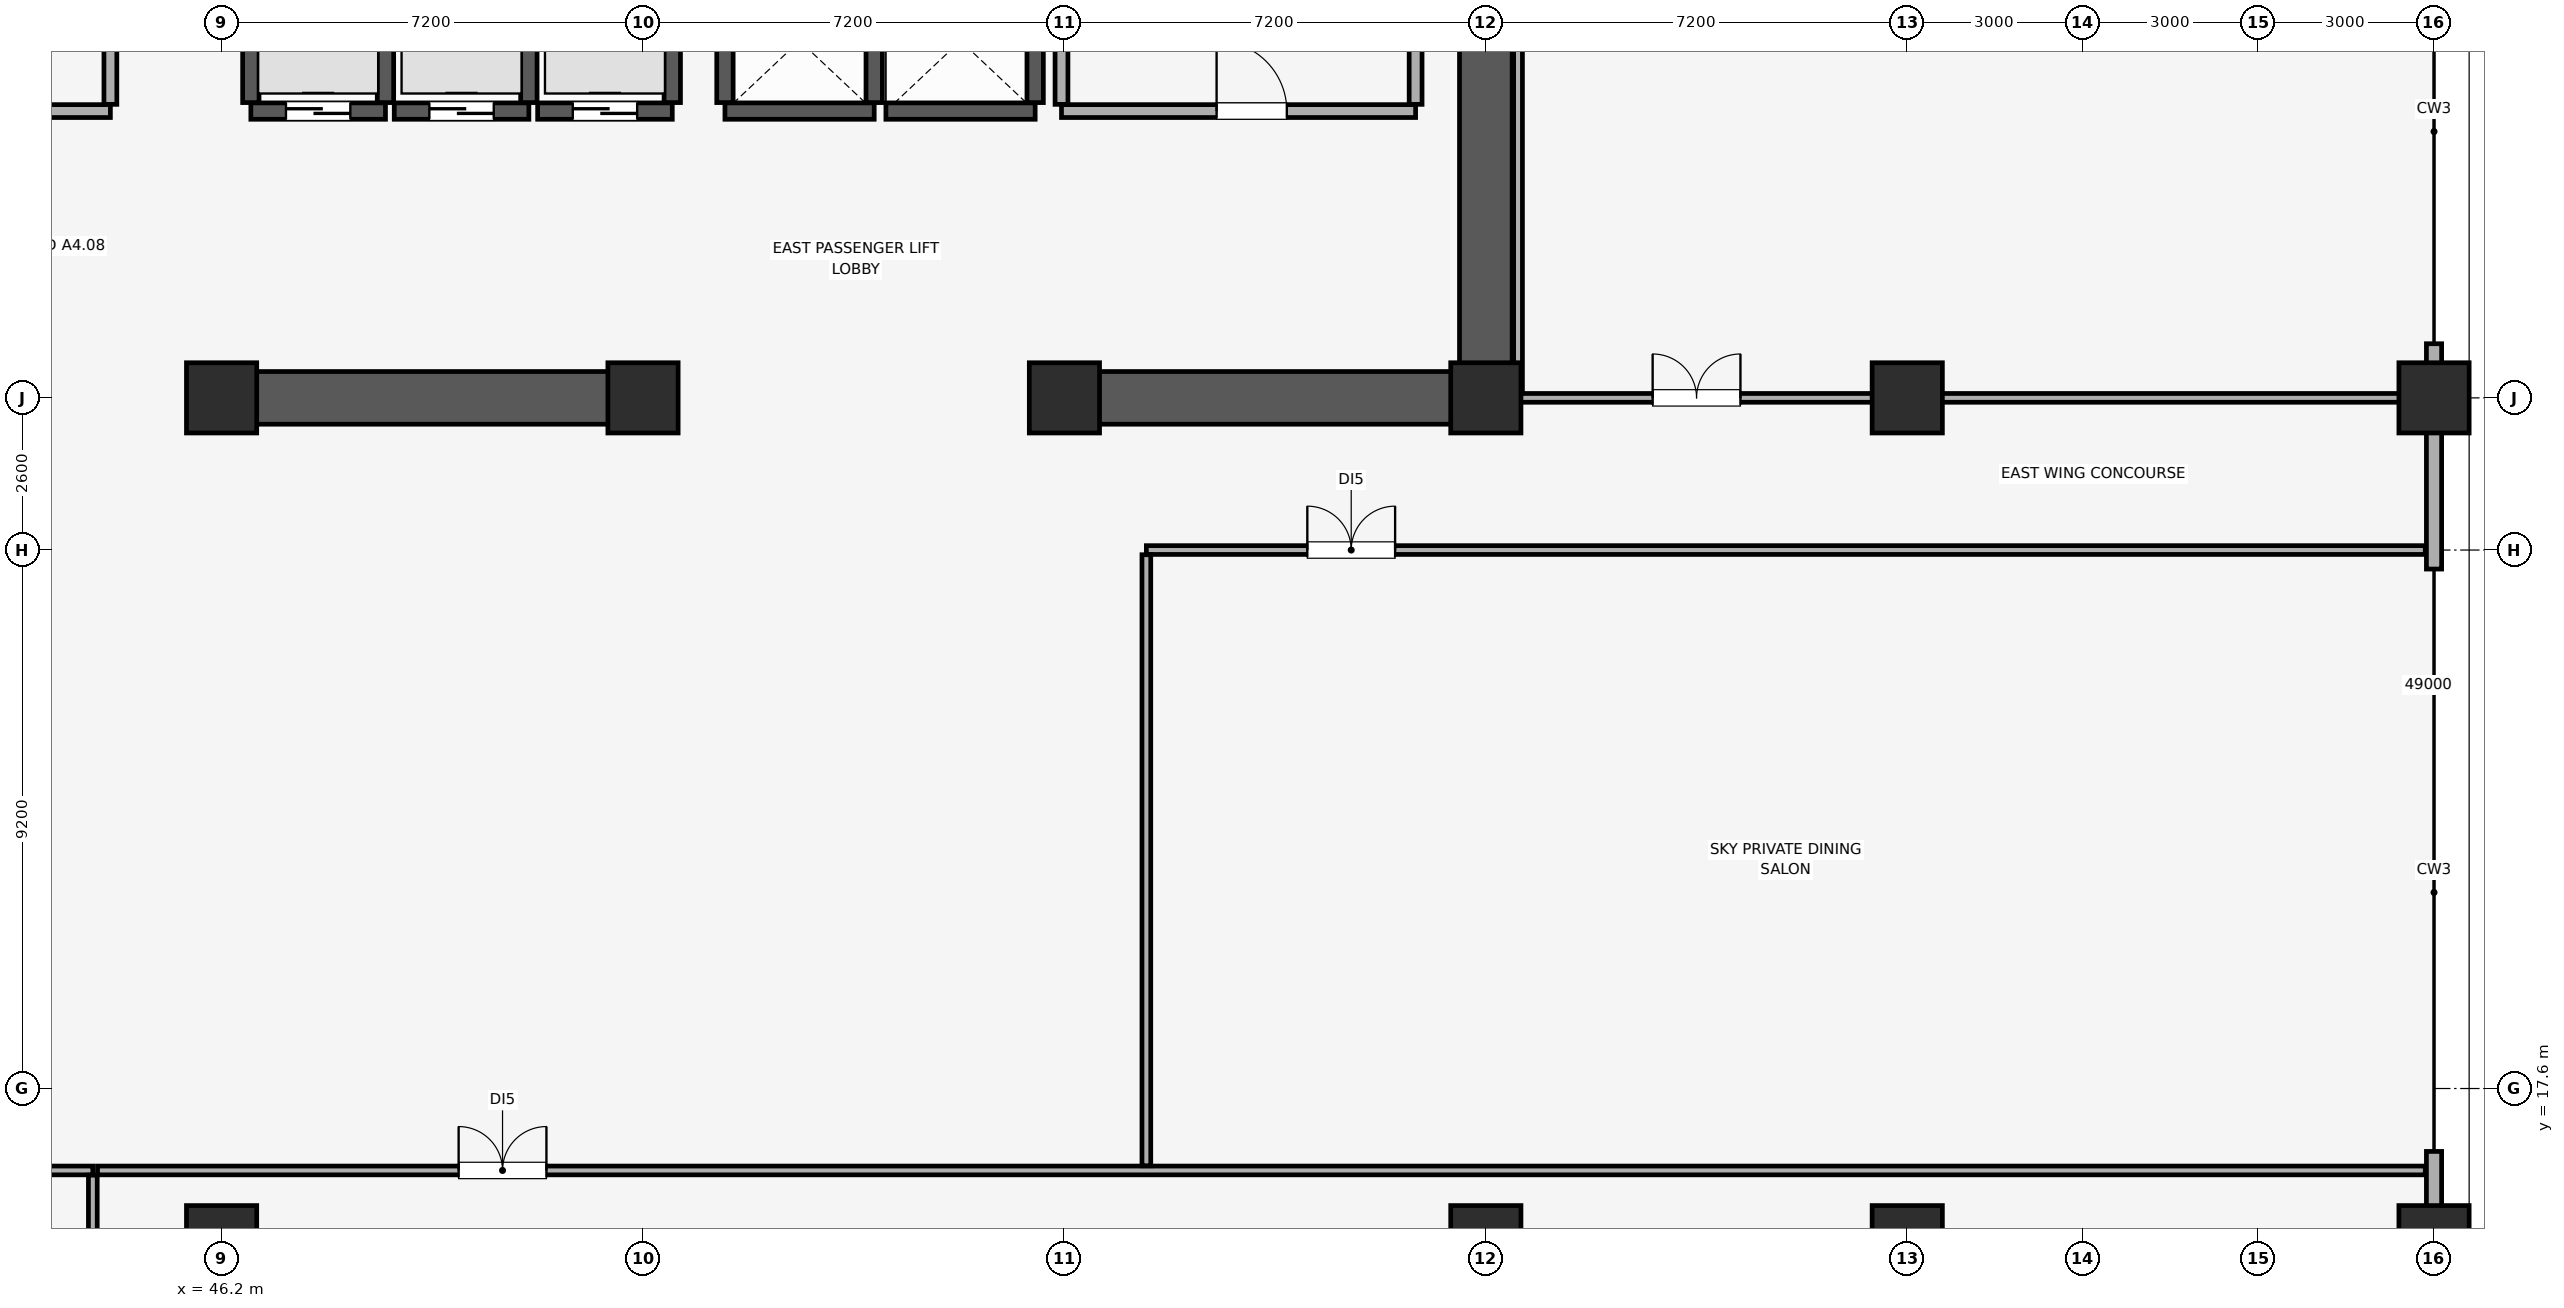
"""IFC4 building model, lengths in metres.
Left out: names, types, materials, properties, quantities, classifications, styles, units other than length and angle.
Written with IfcOpenShell. Run it as: python <this file> out.ifc"""

import sys

from ifc_helpers import new_model, si_unit, direction, frame, frame_2d, origin, origin_2d, place, context, subcontext, project, spatial, rectangle, extrude, element, fill, save


model = new_model("IFC4")
c1 = context("Model", 3, precision=1e-05, world=origin(), true_north=direction((0.0, 1.0)))
c2 = subcontext(c1, "Body", "Model", "MODEL_VIEW")
j1 = project(units=[si_unit("LENGTHUNIT", "METRE"), si_unit("PLANEANGLEUNIT", "RADIAN")], contexts=[c1])
p1 = place(None, origin())
s1 = spatial("IfcSite", under=j1, at=p1, CompositionType="ELEMENT")
p2 = place(p1, origin())
s2 = spatial("IfcBuilding", under=s1, at=p2, CompositionType="ELEMENT")
p3 = place(p2, frame((0.0, 0.0, 130.55)))
s3 = spatial("IfcBuildingStorey", under=s2, at=p3, CompositionType="ELEMENT", Elevation=130.55)
for number, where, z_axis, x_axis in (
    (1, (84.0, 15.0, 0.0), (0.0, 0.0, 1.0), (1.0, 0.0, 0.0)),
    (2, (84.0, 29.4, 0.0), (0.0, 0.0, 1.0), (1.0, 0.0, 0.0)),
    (3, (46.2, 15.0, 0.0), (0.0, 0.0, 1.0), (1.0, 0.0, 0.0)),
    (4, (67.8, 15.0, 0.0), (0.0, 0.0, 1.0), (1.0, 0.0, 0.0)),
    (5, (75.0, 15.0, 0.0), (0.0, 0.0, 1.0), (1.0, 0.0, 0.0)),
    (6, (46.2, 29.4, 0.0), (0.0, 0.0, 1.0), (1.0, 0.0, 0.0)),
    (7, (53.4, 29.4, 0.0), (0.0, 0.0, 1.0), (1.0, 0.0, 0.0)),
    (8, (60.6, 29.4, 0.0), (0.0, 0.0, 1.0), (1.0, 0.0, 0.0)),
    (9, (67.8, 29.4, 0.0), (0.0, 0.0, 1.0), (1.0, 0.0, 0.0)),
    (10, (75.0, 29.4, 0.0), (0.0, 0.0, 1.0), (1.0, 0.0, 0.0)),
):
    element("IfcColumn", number, at=place(p3, frame(where, z_axis=z_axis, x_axis=x_axis)), inside=s3, PredefinedType="COLUMN", context=c2, shape_type="SweptSolid", body=[
        extrude(rectangle(XDim=1.2, YDim=1.2, at=origin_2d()), origin(), (0.0, 0.0, 1.0), 4.56),
    ])
p4 = place(p3, frame((84.0, 14.075, 0.0), z_axis=(0.0, 0.0, 1.0), x_axis=(0.0, 1.0, 0.0)))
e11 = element("IfcWall", 11, at=p4, inside=s3, PredefinedType="SOLIDWALL", context=c2, shape_type="SweptSolid", body=[
    extrude(rectangle(XDim=2.45, YDim=0.26, at=frame_2d((1.225, 0.0))), origin(), (0.0, 0.0, 1.0), 4.52),
])
p5 = place(p3, frame((84.0, 26.475, 0.0), z_axis=(0.0, 0.0, 1.0), x_axis=(0.0, 1.0, 0.0)))
e12 = element("IfcWall", 12, at=p5, inside=s3, PredefinedType="SOLIDWALL", context=c2, shape_type="SweptSolid", body=[
    extrude(rectangle(XDim=3.85, YDim=0.26, at=frame_2d((1.925, 0.0))), origin(), (0.0, 0.0, 1.0), 4.52),
])
p6 = place(p3, frame((67.8, 29.4, 0.0), z_axis=(0.0, 0.0, 1.0), x_axis=(0.0, 1.0, 0.0)))
e13 = element("IfcWall", 13, at=p6, inside=s3, PredefinedType="SHEAR", context=c2, shape_type="SweptSolid", body=[
    extrude(rectangle(XDim=19.2, YDim=0.9, at=frame_2d((9.6, 0.0))), origin(), (0.0, 0.0, 1.0), 4.52),
])
p7 = place(p3, frame((46.0, 29.4, 0.0), z_axis=(0.0, 0.0, 1.0), x_axis=(1.0, 0.0, 0.0)))
e14 = element("IfcWall", 14, at=p7, inside=s3, PredefinedType="SHEAR", context=c2, shape_type="SweptSolid", body=[
    extrude(rectangle(XDim=7.6, YDim=0.9, at=frame_2d((3.8, 0.0))), origin(), (0.0, 0.0, 1.0), 4.52),
])
p8 = place(p3, frame((60.4, 29.4, 0.0), z_axis=(0.0, 0.0, 1.0), x_axis=(1.0, 0.0, 0.0)))
e15 = element("IfcWall", 15, at=p8, inside=s3, PredefinedType="SHEAR", context=c2, shape_type="SweptSolid", body=[
    extrude(rectangle(XDim=6.945, YDim=0.9, at=frame_2d((3.473, 0.0))), origin(), (0.0, 0.0, 1.0), 4.52),
])
p9 = place(p3, frame((46.7, 34.3, 0.0), z_axis=(0.0, 0.0, 1.0), x_axis=(1.0, 0.0, 0.0)))
e16 = element("IfcWall", 16, at=p9, inside=s3, PredefinedType="SHEAR", context=c2, shape_type="SweptSolid", body=[
    extrude(rectangle(XDim=2.3, YDim=0.28, at=frame_2d((1.15, 0.0))), origin(), (0.0, 0.0, 1.0), 4.52),
])
p10 = place(p9, frame((0.6, 0.0, 0.0)))
e17 = element("IfcOpeningElement", 17, at=p10, cuts=e16, PredefinedType="OPENING", context=c2, shape_type="SweptSolid", body=[
    extrude(rectangle(XDim=1.1, YDim=2.2, at=frame_2d((0.55, 1.1))), frame((0.0, 0.15, 0.0), z_axis=(0.0, -1.0, 0.0), x_axis=(1.0, 0.0, 0.0)), (0.0, 0.0, 1.0), 0.3),
])
for number, where, z_axis, x_axis in (
    (18, (46.7, 34.445, 0.0), (0.0, 0.0, 1.0), (0.0, 1.0, 0.0)),
    (19, (49.0, 34.445, 0.0), (0.0, 0.0, 1.0), (0.0, 1.0, 0.0)),
):
    element("IfcWall", number, at=place(p3, frame(where, z_axis=z_axis, x_axis=x_axis)), inside=s3, PredefinedType="SHEAR", context=c2, shape_type="SweptSolid", body=[
        extrude(rectangle(XDim=2.01, YDim=0.28, at=frame_2d((1.005, 0.0))), origin(), (0.0, 0.0, 1.0), 4.52),
    ])
p11 = place(p3, frame((49.15, 34.3, 0.0), z_axis=(0.0, 0.0, 1.0), x_axis=(1.0, 0.0, 0.0)))
e20 = element("IfcWall", 20, at=p11, inside=s3, PredefinedType="SHEAR", context=c2, shape_type="SweptSolid", body=[
    extrude(rectangle(XDim=2.3, YDim=0.28, at=frame_2d((1.15, 0.0))), origin(), (0.0, 0.0, 1.0), 4.52),
])
p12 = place(p11, frame((0.6, 0.0, 0.0)))
e21 = element("IfcOpeningElement", 21, at=p12, cuts=e20, PredefinedType="OPENING", context=c2, shape_type="SweptSolid", body=[
    extrude(rectangle(XDim=1.1, YDim=2.2, at=frame_2d((0.55, 1.1))), frame((0.0, 0.15, 0.0), z_axis=(0.0, -1.0, 0.0), x_axis=(1.0, 0.0, 0.0)), (0.0, 0.0, 1.0), 0.3),
])
p13 = place(p3, frame((51.45, 34.445, 0.0), z_axis=(0.0, 0.0, 1.0), x_axis=(0.0, 1.0, 0.0)))
e22 = element("IfcWall", 22, at=p13, inside=s3, PredefinedType="SHEAR", context=c2, shape_type="SweptSolid", body=[
    extrude(rectangle(XDim=2.01, YDim=0.28, at=frame_2d((1.005, 0.0))), origin(), (0.0, 0.0, 1.0), 4.52),
])
p14 = place(p3, frame((51.6, 34.3, 0.0), z_axis=(0.0, 0.0, 1.0), x_axis=(1.0, 0.0, 0.0)))
e23 = element("IfcWall", 23, at=p14, inside=s3, PredefinedType="SHEAR", context=c2, shape_type="SweptSolid", body=[
    extrude(rectangle(XDim=2.3, YDim=0.28, at=frame_2d((1.15, 0.0))), origin(), (0.0, 0.0, 1.0), 4.52),
])
p15 = place(p14, frame((0.6, 0.0, 0.0)))
e24 = element("IfcOpeningElement", 24, at=p15, cuts=e23, PredefinedType="OPENING", context=c2, shape_type="SweptSolid", body=[
    extrude(rectangle(XDim=1.1, YDim=2.2, at=frame_2d((0.55, 1.1))), frame((0.0, 0.15, 0.0), z_axis=(0.0, -1.0, 0.0), x_axis=(1.0, 0.0, 0.0)), (0.0, 0.0, 1.0), 0.3),
])
p16 = place(p3, frame((53.9, 34.445, 0.0), z_axis=(0.0, 0.0, 1.0), x_axis=(0.0, 1.0, 0.0)))
e25 = element("IfcWall", 25, at=p16, inside=s3, PredefinedType="SHEAR", context=c2, shape_type="SweptSolid", body=[
    extrude(rectangle(XDim=2.01, YDim=0.28, at=frame_2d((1.005, 0.0))), origin(), (0.0, 0.0, 1.0), 4.52),
])
p17 = place(p3, frame((54.8, 34.3, 0.0), z_axis=(0.0, 0.0, 1.0), x_axis=(1.0, 0.0, 0.0)))
e26 = element("IfcWall", 26, at=p17, inside=s3, PredefinedType="SHEAR", context=c2, shape_type="SweptSolid", body=[
    extrude(rectangle(XDim=2.55, YDim=0.28, at=frame_2d((1.275, 0.0))), origin(), (0.0, 0.0, 1.0), 4.52),
])
for number, where, z_axis, x_axis in (
    (27, (54.8, 34.445, 0.0), (0.0, 0.0, 1.0), (0.0, 1.0, 0.0)),
    (28, (57.35, 34.445, 0.0), (0.0, 0.0, 1.0), (0.0, 1.0, 0.0)),
):
    element("IfcWall", number, at=place(p3, frame(where, z_axis=z_axis, x_axis=x_axis)), inside=s3, PredefinedType="SHEAR", context=c2, shape_type="SweptSolid", body=[
        extrude(rectangle(XDim=2.11, YDim=0.28, at=frame_2d((1.055, 0.0))), origin(), (0.0, 0.0, 1.0), 4.52),
    ])
p18 = place(p3, frame((57.55, 34.3, 0.0), z_axis=(0.0, 0.0, 1.0), x_axis=(1.0, 0.0, 0.0)))
e29 = element("IfcWall", 29, at=p18, inside=s3, PredefinedType="SHEAR", context=c2, shape_type="SweptSolid", body=[
    extrude(rectangle(XDim=2.55, YDim=0.28, at=frame_2d((1.275, 0.0))), origin(), (0.0, 0.0, 1.0), 4.52),
])
p19 = place(p3, frame((60.1, 34.445, 0.0), z_axis=(0.0, 0.0, 1.0), x_axis=(0.0, 1.0, 0.0)))
e30 = element("IfcWall", 30, at=p19, inside=s3, PredefinedType="SHEAR", context=c2, shape_type="SweptSolid", body=[
    extrude(rectangle(XDim=2.11, YDim=0.28, at=frame_2d((1.055, 0.0))), origin(), (0.0, 0.0, 1.0), 4.52),
])
p20 = place(p3, frame((60.55, 34.3, 0.0), z_axis=(0.0, 0.0, 1.0), x_axis=(1.0, 0.0, 0.0)))
e31 = element("IfcWall", 31, at=p20, inside=s3, PredefinedType="PARTITIONING", context=c2, shape_type="SweptSolid", body=[
    extrude(rectangle(XDim=6.05, YDim=0.22, at=frame_2d((3.025, 0.0))), origin(), (0.0, 0.0, 1.0), 4.52),
])
p21 = place(p20, frame((2.65, 0.0, 0.0)))
e32 = element("IfcOpeningElement", 32, at=p21, cuts=e31, PredefinedType="OPENING", context=c2, shape_type="SweptSolid", body=[
    extrude(rectangle(XDim=1.2, YDim=2.15, at=frame_2d((0.6, 1.075))), frame((0.0, 0.12, 0.0), z_axis=(0.0, -1.0, 0.0), x_axis=(1.0, 0.0, 0.0)), (0.0, 0.0, 1.0), 0.24),
])
p22 = place(p3, frame((60.55, 34.415, 0.0), z_axis=(0.0, 0.0, 1.0), x_axis=(0.0, 1.0, 0.0)))
e33 = element("IfcWall", 33, at=p22, inside=s3, PredefinedType="PARTITIONING", context=c2, shape_type="SweptSolid", body=[
    extrude(rectangle(XDim=5.64, YDim=0.22, at=frame_2d((2.82, 0.0))), origin(), (0.0, 0.0, 1.0), 4.52),
])
p23 = place(p3, frame((66.6, 34.415, 0.0), z_axis=(0.0, 0.0, 1.0), x_axis=(0.0, 1.0, 0.0)))
e34 = element("IfcWall", 34, at=p23, inside=s3, PredefinedType="PARTITIONING", context=c2, shape_type="SweptSolid", body=[
    extrude(rectangle(XDim=5.43, YDim=0.22, at=frame_2d((2.715, 0.0))), origin(), (0.0, 0.0, 1.0), 4.52),
])
p24 = place(p3, frame((39.7, 34.3, 0.0), z_axis=(0.0, 0.0, 1.0), x_axis=(1.0, 0.0, 0.0)))
e35 = element("IfcWall", 35, at=p24, inside=s3, PredefinedType="PARTITIONING", context=c2, shape_type="SweptSolid", body=[
    extrude(rectangle(XDim=4.6, YDim=0.22, at=frame_2d((2.3, 0.0))), origin(), (0.0, 0.0, 1.0), 4.52),
])
p25 = place(p24, frame((1.7, 0.0, 0.0)))
e36 = element("IfcOpeningElement", 36, at=p25, cuts=e35, PredefinedType="OPENING", context=c2, shape_type="SweptSolid", body=[
    extrude(rectangle(XDim=1.2, YDim=2.15, at=frame_2d((0.6, 1.075))), frame((0.0, 0.12, 0.0), z_axis=(0.0, -1.0, 0.0), x_axis=(1.0, 0.0, 0.0)), (0.0, 0.0, 1.0), 0.24),
])
p26 = place(p3, frame((44.3, 34.415, 0.0), z_axis=(0.0, 0.0, 1.0), x_axis=(0.0, 1.0, 0.0)))
e37 = element("IfcWall", 37, at=p26, inside=s3, PredefinedType="PARTITIONING", context=c2, shape_type="SweptSolid", body=[
    extrude(rectangle(XDim=5.785, YDim=0.22, at=frame_2d((2.893, 0.0))), origin(), (0.0, 0.0, 1.0), 4.52),
])
p27 = place(p3, frame((0.15, 16.2, 0.0), z_axis=(0.0, 0.0, 1.0), x_axis=(1.0, 0.0, 0.0)))
e38 = element("IfcWall", 38, at=p27, inside=s3, PredefinedType="PARTITIONING", context=c2, shape_type="SweptSolid", body=[
    extrude(rectangle(XDim=43.85, YDim=0.15, at=frame_2d((21.925, 0.0))), origin(), (0.0, 0.0, 1.0), 4.52),
])
p28 = place(p27, frame((31.1, 0.0, 0.0)))
e39 = element("IfcOpeningElement", 39, at=p28, cuts=e38, PredefinedType="OPENING", context=c2, shape_type="SweptSolid", body=[
    extrude(rectangle(XDim=1.5, YDim=2.25, at=frame_2d((0.75, 1.125))), frame((0.0, 0.085, 0.0), z_axis=(0.0, -1.0, 0.0), x_axis=(1.0, 0.0, 0.0)), (0.0, 0.0, 1.0), 0.17),
])
p29 = place(p3, frame((44.0, 0.15, 0.0), z_axis=(0.0, 0.0, 1.0), x_axis=(0.0, 1.0, 0.0)))
e40 = element("IfcWall", 40, at=p29, inside=s3, PredefinedType="PARTITIONING", context=c2, shape_type="SweptSolid", body=[
    extrude(rectangle(XDim=15.97, YDim=0.15, at=frame_2d((7.985, 0.0))), origin(), (0.0, 0.0, 1.0), 4.52),
])
p30 = place(p3, frame((44.08, 16.2, 0.0), z_axis=(0.0, 0.0, 1.0), x_axis=(1.0, 0.0, 0.0)))
e41 = element("IfcWall", 41, at=p30, inside=s3, PredefinedType="PARTITIONING", context=c2, shape_type="SweptSolid", body=[
    extrude(rectangle(XDim=39.77, YDim=0.15, at=frame_2d((19.885, 0.0))), origin(), (0.0, 0.0, 1.0), 4.52),
])
p31 = place(p30, frame((6.17, 0.0, 0.0)))
e42 = element("IfcOpeningElement", 42, at=p31, cuts=e41, PredefinedType="OPENING", context=c2, shape_type="SweptSolid", body=[
    extrude(rectangle(XDim=1.5, YDim=2.25, at=frame_2d((0.75, 1.125))), frame((0.0, 0.085, 0.0), z_axis=(0.0, -1.0, 0.0), x_axis=(1.0, 0.0, 0.0)), (0.0, 0.0, 1.0), 0.17),
])
p32 = place(p3, frame((62.0, 26.8, 0.0), z_axis=(0.0, 0.0, 1.0), x_axis=(1.0, 0.0, 0.0)))
e43 = element("IfcWall", 43, at=p32, inside=s3, PredefinedType="PARTITIONING", context=c2, shape_type="SweptSolid", body=[
    extrude(rectangle(XDim=21.85, YDim=0.15, at=frame_2d((10.925, 0.0))), origin(), (0.0, 0.0, 1.0), 4.52),
])
p33 = place(p32, frame((2.75, 0.0, 0.0)))
e44 = element("IfcOpeningElement", 44, at=p33, cuts=e43, PredefinedType="OPENING", context=c2, shape_type="SweptSolid", body=[
    extrude(rectangle(XDim=1.5, YDim=2.25, at=frame_2d((0.75, 1.125))), frame((0.0, 0.085, 0.0), z_axis=(0.0, -1.0, 0.0), x_axis=(1.0, 0.0, 0.0)), (0.0, 0.0, 1.0), 0.17),
])
p34 = place(p3, frame((62.0, 16.28, 0.0), z_axis=(0.0, 0.0, 1.0), x_axis=(0.0, 1.0, 0.0)))
e45 = element("IfcWall", 45, at=p34, inside=s3, PredefinedType="PARTITIONING", context=c2, shape_type="SweptSolid", body=[
    extrude(rectangle(XDim=10.44, YDim=0.15, at=frame_2d((5.22, 0.0))), origin(), (0.0, 0.0, 1.0), 4.52),
])
p35 = place(p3, frame((68.35, 29.4, 0.0), z_axis=(0.0, 0.0, 1.0), x_axis=(1.0, 0.0, 0.0)))
e46 = element("IfcWall", 46, at=p35, inside=s3, PredefinedType="PARTITIONING", context=c2, shape_type="SweptSolid", body=[
    extrude(rectangle(XDim=15.5, YDim=0.15, at=frame_2d((7.75, 0.0))), origin(), (0.0, 0.0, 1.0), 3.4),
])
p36 = place(p35, frame((2.3, 0.0, 0.0)))
e47 = element("IfcOpeningElement", 47, at=p36, cuts=e46, PredefinedType="OPENING", context=c2, shape_type="SweptSolid", body=[
    extrude(rectangle(XDim=1.5, YDim=2.25, at=frame_2d((0.75, 1.125))), frame((0.0, 0.085, 0.0), z_axis=(0.0, -1.0, 0.0), x_axis=(1.0, 0.0, 0.0)), (0.0, 0.0, 1.0), 0.17),
])
p37 = place(p3, frame((68.35, 29.48, 0.0), z_axis=(0.0, 0.0, 1.0), x_axis=(0.0, 1.0, 0.0)))
e48 = element("IfcWall", 48, at=p37, inside=s3, PredefinedType="PARTITIONING", context=c2, shape_type="SweptSolid", body=[
    extrude(rectangle(XDim=19.37, YDim=0.15, at=frame_2d((9.685, 0.0))), origin(), (0.0, 0.0, 1.0), 4.52),
])
p38 = place(p10, origin())
e49 = element("IfcDoor", 49, at=p38, inside=s3, OperationType="DOUBLE_DOOR_SLIDING", PredefinedType="DOOR", context=c2, shape_type="SweptSolid", body=[
    extrude(rectangle(XDim=1.1, YDim=2.2, at=frame_2d((0.55, 1.1))), frame((0.0, 0.025, 0.0), z_axis=(0.0, -1.0, 0.0), x_axis=(1.0, 0.0, 0.0)), (0.0, 0.0, 1.0), 0.05),
])
fill(e17, e49)
p39 = place(p12, origin())
e50 = element("IfcDoor", 50, at=p39, inside=s3, OperationType="DOUBLE_DOOR_SLIDING", PredefinedType="DOOR", context=c2, shape_type="SweptSolid", body=[
    extrude(rectangle(XDim=1.1, YDim=2.2, at=frame_2d((0.55, 1.1))), frame((0.0, 0.025, 0.0), z_axis=(0.0, -1.0, 0.0), x_axis=(1.0, 0.0, 0.0)), (0.0, 0.0, 1.0), 0.05),
])
fill(e21, e50)
p40 = place(p15, origin())
e51 = element("IfcDoor", 51, at=p40, inside=s3, OperationType="DOUBLE_DOOR_SLIDING", PredefinedType="DOOR", context=c2, shape_type="SweptSolid", body=[
    extrude(rectangle(XDim=1.1, YDim=2.2, at=frame_2d((0.55, 1.1))), frame((0.0, 0.025, 0.0), z_axis=(0.0, -1.0, 0.0), x_axis=(1.0, 0.0, 0.0)), (0.0, 0.0, 1.0), 0.05),
])
fill(e24, e51)
p41 = place(p21, origin())
e52 = element("IfcDoor", 52, at=p41, inside=s3, OperationType="SINGLE_SWING_LEFT", PredefinedType="DOOR", context=c2, shape_type="SweptSolid", body=[
    extrude(rectangle(XDim=1.2, YDim=2.15, at=frame_2d((0.6, 1.075))), frame((0.0, 0.025, 0.0), z_axis=(0.0, -1.0, 0.0), x_axis=(1.0, 0.0, 0.0)), (0.0, 0.0, 1.0), 0.05),
])
fill(e32, e52)
p42 = place(p31, origin())
e53 = element("IfcDoor", 53, at=p42, inside=s3, OperationType="DOUBLE_DOOR_SINGLE_SWING", PredefinedType="DOOR", context=c2, shape_type="SweptSolid", body=[
    extrude(rectangle(XDim=1.5, YDim=2.25, at=frame_2d((0.75, 1.125))), frame((0.0, 0.025, 0.0), z_axis=(0.0, -1.0, 0.0), x_axis=(1.0, 0.0, 0.0)), (0.0, 0.0, 1.0), 0.05),
])
fill(e42, e53)
p43 = place(p33, origin())
e54 = element("IfcDoor", 54, at=p43, inside=s3, OperationType="DOUBLE_DOOR_SINGLE_SWING", PredefinedType="DOOR", context=c2, shape_type="SweptSolid", body=[
    extrude(rectangle(XDim=1.5, YDim=2.25, at=frame_2d((0.75, 1.125))), frame((0.0, 0.025, 0.0), z_axis=(0.0, -1.0, 0.0), x_axis=(1.0, 0.0, 0.0)), (0.0, 0.0, 1.0), 0.05),
])
fill(e44, e54)
p44 = place(p36, origin())
e55 = element("IfcDoor", 55, at=p44, inside=s3, OperationType="DOUBLE_DOOR_SINGLE_SWING", PredefinedType="DOOR", context=c2, shape_type="SweptSolid", body=[
    extrude(rectangle(XDim=1.5, YDim=2.25, at=frame_2d((0.75, 1.125))), frame((0.0, 0.025, 0.0), z_axis=(0.0, -1.0, 0.0), x_axis=(1.0, 0.0, 0.0)), (0.0, 0.0, 1.0), 0.05),
])
fill(e47, e55)
save(model, sys.argv[1])
